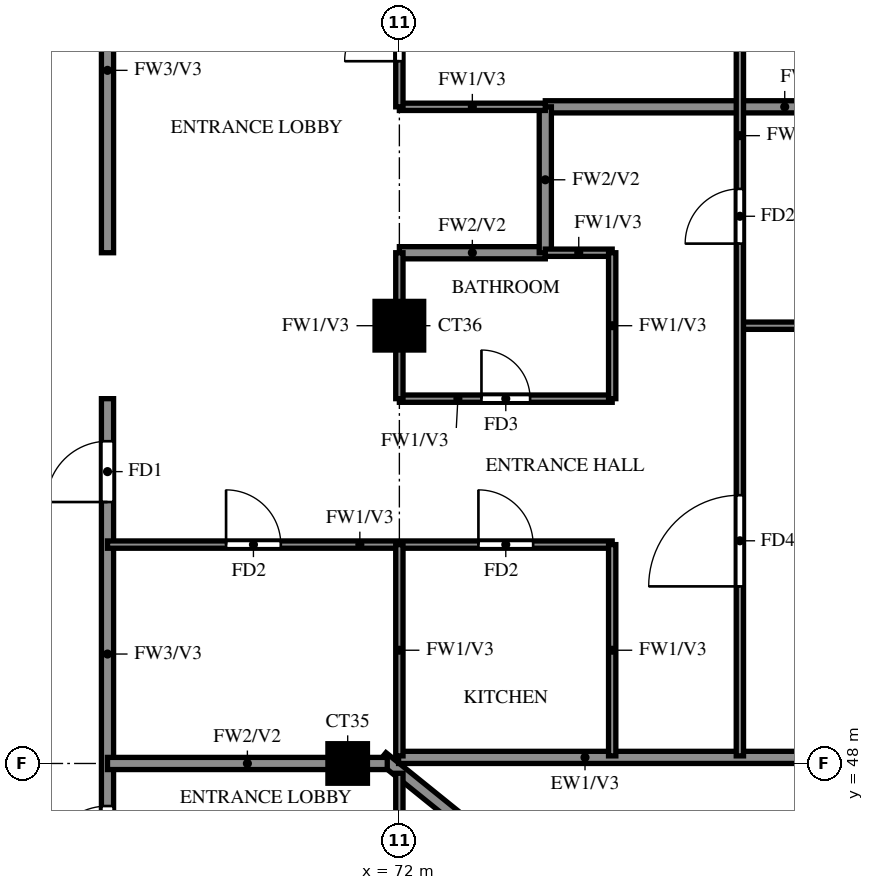
"""IFC4 building model, lengths in metres.
Left out: names, types, materials, properties, quantities, classifications, styles, units other than length and angle.
Written with IfcOpenShell. Run it as: python <this file> out.ifc"""

import sys

from ifc_helpers import new_model, si_unit, direction, frame, frame_2d, origin, origin_2d, place, context, subcontext, project, spatial, rectangle, extrude, source, transform, mapped, element, fill, save


model = new_model("IFC4")
c1 = context("Model", 3, precision=1e-05, world=origin(), true_north=direction((0.0, 1.0)))
c2 = subcontext(c1, "Body", "Model", "MODEL_VIEW")
j1 = project(units=[si_unit("LENGTHUNIT", "METRE"), si_unit("PLANEANGLEUNIT", "RADIAN")], contexts=[c1])
p1 = place(None, origin())
s1 = spatial("IfcSite", under=j1, at=p1, CompositionType="ELEMENT")
p2 = place(p1, origin())
s2 = spatial("IfcBuilding", under=s1, at=p2, CompositionType="ELEMENT")
p3 = place(p2, frame((0.0, 0.0, 246.5)))
s3 = spatial("IfcBuildingStorey", under=s2, at=p3, CompositionType="ELEMENT", Elevation=246.5)
m1 = source(origin(), c2, "Body", "SweptSolid", [
    extrude(rectangle(XDim=0.65, YDim=0.65, at=origin_2d()), origin(), (0.0, 0.0, 1.0), 3.22),
])
p4 = place(p3, frame((71.15, 48.0, 0.0), z_axis=(0.0, 0.0, 1.0), x_axis=(1.0, 0.0, 0.0)))
e1 = element("IfcColumn", 1, at=p4, inside=s3, PredefinedType="COLUMN", context=c2, shape_type="MappedRepresentation", body=[
    mapped(m1, transform((0.0, 0.0, 0.0))),
])
m2 = source(origin(), c2, "Body", "SweptSolid", [
    extrude(rectangle(XDim=0.8, YDim=0.8, at=origin_2d()), origin(), (0.0, 0.0, 1.0), 3.22),
])
p5 = place(p3, frame((72.0, 55.2, 0.0), z_axis=(0.0, 0.0, 1.0), x_axis=(1.0, 0.0, 0.0)))
e2 = element("IfcColumn", 2, at=p5, inside=s3, PredefinedType="COLUMN", context=c2, shape_type="MappedRepresentation", body=[
    mapped(m2, transform((0.0, 0.0, 0.0))),
])
p6 = place(p3, frame((81.907, 39.87, 0.0), z_axis=(0.0, 0.0, 1.0), x_axis=(-0.777936274417, 0.62834318087, 0.0)))
e3 = element("IfcWall", 3, at=p6, inside=s3, PredefinedType="SOLIDWALL", context=c2, shape_type="SweptSolid", body=[
    extrude(rectangle(XDim=13.099, YDim=0.2, at=frame_2d((6.549, 0.0))), origin(), (0.0, 0.0, 1.0), 3.22),
])
p7 = place(p6, frame((9.938, 0.0, 1.5)))
e4 = element("IfcOpeningElement", 4, at=p7, cuts=e3, PredefinedType="OPENING", context=c2, shape_type="SweptSolid", body=[
    extrude(rectangle(XDim=0.9, YDim=0.9, at=frame_2d((0.45, 0.45))), frame((0.0, 0.11, 0.0), z_axis=(0.0, -1.0, 0.0), x_axis=(1.0, 0.0, 0.0)), (0.0, 0.0, 1.0), 0.22),
])
p8 = place(p3, frame((71.987, 48.1, 0.0), z_axis=(0.0, 0.0, 1.0), x_axis=(1.0, 0.0, 0.0)))
e5 = element("IfcWall", 5, at=p8, inside=s3, PredefinedType="SOLIDWALL", context=c2, shape_type="SweptSolid", body=[
    extrude(rectangle(XDim=6.813, YDim=0.2, at=frame_2d((3.406, 0.0))), origin(), (0.0, 0.0, 1.0), 3.22),
])
p9 = place(p3, frame((67.2, 45.6, 0.0), z_axis=(0.0, 0.0, 1.0), x_axis=(0.0, 1.0, 0.0)))
e6 = element("IfcWall", 6, at=p9, inside=s3, PredefinedType="SOLIDWALL", context=c2, shape_type="SweptSolid", body=[
    extrude(rectangle(XDim=8.4, YDim=0.2, at=frame_2d((4.2, 0.0))), origin(), (0.0, 0.0, 1.0), 3.22),
])
p10 = place(p9, frame((6.7, 0.0, 0.0)))
e7 = element("IfcOpeningElement", 7, at=p10, cuts=e6, PredefinedType="OPENING", context=c2, shape_type="SweptSolid", body=[
    extrude(rectangle(XDim=1.0, YDim=2.1, at=frame_2d((0.5, 1.05))), frame((0.0, 0.11, 0.0), z_axis=(0.0, -1.0, 0.0), x_axis=(1.0, 0.0, 0.0)), (0.0, 0.0, 1.0), 0.22),
])
p11 = place(p9, frame((0.7, 0.0, 0.0)))
e8 = element("IfcOpeningElement", 8, at=p11, cuts=e6, PredefinedType="OPENING", context=c2, shape_type="SweptSolid", body=[
    extrude(rectangle(XDim=1.0, YDim=2.1, at=frame_2d((0.5, 1.05))), frame((0.0, 0.11, 0.0), z_axis=(0.0, -1.0, 0.0), x_axis=(1.0, 0.0, 0.0)), (0.0, 0.0, 1.0), 0.22),
])
p12 = place(p3, frame((67.2, 56.4, 0.0), z_axis=(0.0, 0.0, 1.0), x_axis=(0.0, 1.0, 0.0)))
e9 = element("IfcWall", 9, at=p12, inside=s3, PredefinedType="SOLIDWALL", context=c2, shape_type="SweptSolid", body=[
    extrude(rectangle(XDim=6.0, YDim=0.2, at=frame_2d((3.0, 0.0))), origin(), (0.0, 0.0, 1.0), 3.22),
])
p13 = place(p12, frame((3.7, 0.0, 0.0)))
e10 = element("IfcOpeningElement", 10, at=p13, cuts=e9, PredefinedType="OPENING", context=c2, shape_type="SweptSolid", body=[
    extrude(rectangle(XDim=1.0, YDim=2.1, at=frame_2d((0.5, 1.05))), frame((0.0, 0.11, 0.0), z_axis=(0.0, -1.0, 0.0), x_axis=(1.0, 0.0, 0.0)), (0.0, 0.0, 1.0), 0.22),
])
p14 = place(p3, frame((67.2, 48.0, 0.0), z_axis=(0.0, 0.0, 1.0), x_axis=(1.0, 0.0, 0.0)))
e11 = element("IfcWall", 11, at=p14, inside=s3, PredefinedType="SOLIDWALL", context=c2, shape_type="SweptSolid", body=[
    extrude(rectangle(XDim=4.601, YDim=0.2, at=frame_2d((2.301, 0.0))), origin(), (0.0, 0.0, 1.0), 3.22),
])
p15 = place(p3, frame((72.0, 56.4, 0.0), z_axis=(0.0, 0.0, 1.0), x_axis=(1.0, 0.0, 0.0)))
e12 = element("IfcWall", 12, at=p15, inside=s3, PredefinedType="SOLIDWALL", context=c2, shape_type="SweptSolid", body=[
    extrude(rectangle(XDim=2.4, YDim=0.2, at=frame_2d((1.2, 0.0))), origin(), (0.0, 0.0, 1.0), 3.22),
])
p16 = place(p3, frame((74.4, 58.8, 0.0), z_axis=(0.0, 0.0, 1.0), x_axis=(1.0, 0.0, 0.0)))
e13 = element("IfcWall", 13, at=p16, inside=s3, PredefinedType="SOLIDWALL", context=c2, shape_type="SweptSolid", body=[
    extrude(rectangle(XDim=7.875, YDim=0.2, at=frame_2d((3.938, 0.0))), origin(), (0.0, 0.0, 1.0), 2.32),
])
p17 = place(p3, frame((74.4, 56.4, 0.0), z_axis=(0.0, 0.0, 1.0), x_axis=(0.0, 1.0, 0.0)))
e14 = element("IfcWall", 14, at=p17, inside=s3, PredefinedType="SOLIDWALL", context=c2, shape_type="SweptSolid", body=[
    extrude(rectangle(XDim=2.4, YDim=0.2, at=frame_2d((1.2, 0.0))), origin(), (0.0, 0.0, 1.0), 3.22),
])
p18 = place(p3, frame((67.2, 51.6, 0.0), z_axis=(0.0, 0.0, 1.0), x_axis=(1.0, 0.0, 0.0)))
e15 = element("IfcWall", 15, at=p18, inside=s3, PredefinedType="PARTITIONING", context=c2, shape_type="SweptSolid", body=[
    extrude(rectangle(XDim=8.3, YDim=0.12, at=frame_2d((4.15, 0.0))), origin(), (0.0, 0.0, 1.0), 3.22),
])
p19 = place(p18, frame((6.1, 0.0, 0.0)))
e16 = element("IfcOpeningElement", 16, at=p19, cuts=e15, PredefinedType="OPENING", context=c2, shape_type="SweptSolid", body=[
    extrude(rectangle(XDim=0.9, YDim=2.1, at=frame_2d((0.45, 1.05))), frame((0.0, 0.07, 0.0), z_axis=(0.0, -1.0, 0.0), x_axis=(1.0, 0.0, 0.0)), (0.0, 0.0, 1.0), 0.14),
])
p20 = place(p18, frame((1.95, 0.0, 0.0)))
e17 = element("IfcOpeningElement", 17, at=p20, cuts=e15, PredefinedType="OPENING", context=c2, shape_type="SweptSolid", body=[
    extrude(rectangle(XDim=0.9, YDim=2.1, at=frame_2d((0.45, 1.05))), frame((0.0, 0.07, 0.0), z_axis=(0.0, -1.0, 0.0), x_axis=(1.0, 0.0, 0.0)), (0.0, 0.0, 1.0), 0.14),
])
p21 = place(p3, frame((72.0, 54.0, 0.0), z_axis=(0.0, 0.0, 1.0), x_axis=(1.0, 0.0, 0.0)))
e18 = element("IfcWall", 18, at=p21, inside=s3, PredefinedType="PARTITIONING", context=c2, shape_type="SweptSolid", body=[
    extrude(rectangle(XDim=3.5, YDim=0.12, at=frame_2d((1.75, 0.0))), origin(), (0.0, 0.0, 1.0), 3.22),
])
p22 = place(p21, frame((1.35, 0.0, 0.0)))
e19 = element("IfcOpeningElement", 19, at=p22, cuts=e18, PredefinedType="OPENING", context=c2, shape_type="SweptSolid", body=[
    extrude(rectangle(XDim=0.8, YDim=2.1, at=frame_2d((0.4, 1.05))), frame((0.0, 0.07, 0.0), z_axis=(0.0, -1.0, 0.0), x_axis=(1.0, 0.0, 0.0)), (0.0, 0.0, 1.0), 0.14),
])
p23 = place(p3, frame((77.6, 55.2, 0.0), z_axis=(0.0, 0.0, 1.0), x_axis=(1.0, 0.0, 0.0)))
e20 = element("IfcWall", 20, at=p23, inside=s3, PredefinedType="PARTITIONING", context=c2, shape_type="SweptSolid", body=[
    extrude(rectangle(XDim=4.675, YDim=0.12, at=frame_2d((2.337, 0.0))), origin(), (0.0, 0.0, 1.0), 3.22),
])
p24 = place(p3, frame((74.4, 56.4, 0.0), z_axis=(0.0, 0.0, 1.0), x_axis=(1.0, 0.0, 0.0)))
e21 = element("IfcWall", 21, at=p24, inside=s3, PredefinedType="PARTITIONING", context=c2, shape_type="SweptSolid", body=[
    extrude(rectangle(XDim=1.1, YDim=0.12, at=frame_2d((0.55, 0.0))), origin(), (0.0, 0.0, 1.0), 3.22),
])
p25 = place(p3, frame((72.0, 58.8, 0.0), z_axis=(0.0, 0.0, 1.0), x_axis=(1.0, 0.0, 0.0)))
e22 = element("IfcWall", 22, at=p25, inside=s3, PredefinedType="PARTITIONING", context=c2, shape_type="SweptSolid", body=[
    extrude(rectangle(XDim=2.4, YDim=0.12, at=frame_2d((1.2, 0.0))), origin(), (0.0, 0.0, 1.0), 3.22),
])
p26 = place(p3, frame((72.0, 39.725, 0.0), z_axis=(0.0, 0.0, 1.0), x_axis=(0.0, 1.0, 0.0)))
e23 = element("IfcWall", 23, at=p26, inside=s3, PredefinedType="PARTITIONING", context=c2, shape_type="SweptSolid", body=[
    extrude(rectangle(XDim=8.114, YDim=0.12, at=frame_2d((4.057, 0.0))), origin(), (0.0, 0.0, 1.0), 2.32),
])
p27 = place(p26, frame((1.788, 0.0, 0.0)))
e24 = element("IfcOpeningElement", 24, at=p27, cuts=e23, PredefinedType="OPENING", context=c2, shape_type="SweptSolid", body=[
    extrude(rectangle(XDim=0.9, YDim=2.1, at=frame_2d((0.45, 1.05))), frame((0.0, 0.07, 0.0), z_axis=(0.0, -1.0, 0.0), x_axis=(1.0, 0.0, 0.0)), (0.0, 0.0, 1.0), 0.14),
])
p28 = place(p26, frame((4.575, 0.0, 0.0)))
e25 = element("IfcOpeningElement", 25, at=p28, cuts=e23, PredefinedType="OPENING", context=c2, shape_type="SweptSolid", body=[
    extrude(rectangle(XDim=0.8, YDim=2.1, at=frame_2d((0.4, 1.05))), frame((0.0, 0.07, 0.0), z_axis=(0.0, -1.0, 0.0), x_axis=(1.0, 0.0, 0.0)), (0.0, 0.0, 1.0), 0.14),
])
p29 = place(p3, frame((72.0, 48.125, 0.0), z_axis=(0.0, 0.0, 1.0), x_axis=(0.0, 1.0, 0.0)))
e26 = element("IfcWall", 26, at=p29, inside=s3, PredefinedType="PARTITIONING", context=c2, shape_type="SweptSolid", body=[
    extrude(rectangle(XDim=3.475, YDim=0.12, at=frame_2d((1.738, 0.0))), origin(), (0.0, 0.0, 1.0), 3.22),
])
p30 = place(p3, frame((72.0, 54.0, 0.0), z_axis=(0.0, 0.0, 1.0), x_axis=(0.0, 1.0, 0.0)))
e27 = element("IfcWall", 27, at=p30, inside=s3, PredefinedType="PARTITIONING", context=c2, shape_type="SweptSolid", body=[
    extrude(rectangle(XDim=2.4, YDim=0.12, at=frame_2d((1.2, 0.0))), origin(), (0.0, 0.0, 1.0), 3.22),
])
p31 = place(p3, frame((72.0, 58.8, 0.0), z_axis=(0.0, 0.0, 1.0), x_axis=(0.0, 1.0, 0.0)))
e28 = element("IfcWall", 28, at=p31, inside=s3, PredefinedType="PARTITIONING", context=c2, shape_type="SweptSolid", body=[
    extrude(rectangle(XDim=3.6, YDim=0.12, at=frame_2d((1.8, 0.0))), origin(), (0.0, 0.0, 1.0), 3.22),
])
p32 = place(p31, frame((0.75, 0.0, 0.0)))
e29 = element("IfcOpeningElement", 29, at=p32, cuts=e28, PredefinedType="OPENING", context=c2, shape_type="SweptSolid", body=[
    extrude(rectangle(XDim=0.9, YDim=2.1, at=frame_2d((0.45, 1.05))), frame((0.0, 0.07, 0.0), z_axis=(0.0, -1.0, 0.0), x_axis=(1.0, 0.0, 0.0)), (0.0, 0.0, 1.0), 0.14),
])
p33 = place(p3, frame((75.5, 48.125, 0.0), z_axis=(0.0, 0.0, 1.0), x_axis=(0.0, 1.0, 0.0)))
e30 = element("IfcWall", 30, at=p33, inside=s3, PredefinedType="PARTITIONING", context=c2, shape_type="SweptSolid", body=[
    extrude(rectangle(XDim=3.475, YDim=0.12, at=frame_2d((1.738, 0.0))), origin(), (0.0, 0.0, 1.0), 3.22),
])
p34 = place(p3, frame((75.5, 54.0, 0.0), z_axis=(0.0, 0.0, 1.0), x_axis=(0.0, 1.0, 0.0)))
e31 = element("IfcWall", 31, at=p34, inside=s3, PredefinedType="PARTITIONING", context=c2, shape_type="SweptSolid", body=[
    extrude(rectangle(XDim=2.4, YDim=0.12, at=frame_2d((1.2, 0.0))), origin(), (0.0, 0.0, 1.0), 3.22),
])
p35 = place(p3, frame((77.6, 48.125, 0.0), z_axis=(0.0, 0.0, 1.0), x_axis=(0.0, 1.0, 0.0)))
e32 = element("IfcWall", 32, at=p35, inside=s3, PredefinedType="PARTITIONING", context=c2, shape_type="SweptSolid", body=[
    extrude(rectangle(XDim=21.475, YDim=0.12, at=frame_2d((10.738, 0.0))), origin(), (0.0, 0.0, 1.0), 3.22),
])
p36 = place(p35, frame((2.788, 0.0, 0.0)))
e33 = element("IfcOpeningElement", 33, at=p36, cuts=e32, PredefinedType="OPENING", context=c2, shape_type="SweptSolid", body=[
    extrude(rectangle(XDim=1.5, YDim=2.1, at=frame_2d((0.75, 1.05))), frame((0.0, 0.07, 0.0), z_axis=(0.0, -1.0, 0.0), x_axis=(1.0, 0.0, 0.0)), (0.0, 0.0, 1.0), 0.14),
])
p37 = place(p35, frame((8.425, 0.0, 0.0)))
e34 = element("IfcOpeningElement", 34, at=p37, cuts=e32, PredefinedType="OPENING", context=c2, shape_type="SweptSolid", body=[
    extrude(rectangle(XDim=0.9, YDim=2.1, at=frame_2d((0.45, 1.05))), frame((0.0, 0.07, 0.0), z_axis=(0.0, -1.0, 0.0), x_axis=(1.0, 0.0, 0.0)), (0.0, 0.0, 1.0), 0.14),
])
p38 = place(p35, frame((12.025, 0.0, 0.0)))
e35 = element("IfcOpeningElement", 35, at=p38, cuts=e32, PredefinedType="OPENING", context=c2, shape_type="SweptSolid", body=[
    extrude(rectangle(XDim=0.9, YDim=2.1, at=frame_2d((0.45, 1.05))), frame((0.0, 0.07, 0.0), z_axis=(0.0, -1.0, 0.0), x_axis=(1.0, 0.0, 0.0)), (0.0, 0.0, 1.0), 0.14),
])
p39 = place(p35, frame((17.425, 0.0, 0.0)))
e36 = element("IfcOpeningElement", 36, at=p39, cuts=e32, PredefinedType="OPENING", context=c2, shape_type="SweptSolid", body=[
    extrude(rectangle(XDim=0.9, YDim=2.1, at=frame_2d((0.45, 1.05))), frame((0.0, 0.07, 0.0), z_axis=(0.0, -1.0, 0.0), x_axis=(1.0, 0.0, 0.0)), (0.0, 0.0, 1.0), 0.14),
])
p40 = place(p10, origin())
e37 = element("IfcDoor", 37, at=p40, inside=s3, OperationType="SINGLE_SWING_LEFT", PredefinedType="DOOR", context=c2, shape_type="SweptSolid", body=[
    extrude(rectangle(XDim=1.0, YDim=2.1, at=frame_2d((0.5, 1.05))), frame((0.0, 0.025, 0.0), z_axis=(0.0, -1.0, 0.0), x_axis=(1.0, 0.0, 0.0)), (0.0, 0.0, 1.0), 0.05),
])
fill(e7, e37)
p41 = place(p36, origin())
e38 = element("IfcDoor", 38, at=p41, inside=s3, OperationType="SINGLE_SWING_LEFT", PredefinedType="DOOR", context=c2, shape_type="SweptSolid", body=[
    extrude(rectangle(XDim=1.5, YDim=2.1, at=frame_2d((0.75, 1.05))), frame((0.0, 0.025, 0.0), z_axis=(0.0, -1.0, 0.0), x_axis=(1.0, 0.0, 0.0)), (0.0, 0.0, 1.0), 0.05),
])
fill(e33, e38)
p42 = place(p37, origin())
e39 = element("IfcDoor", 39, at=p42, inside=s3, OperationType="SINGLE_SWING_RIGHT", PredefinedType="DOOR", context=c2, shape_type="SweptSolid", body=[
    extrude(rectangle(XDim=0.9, YDim=2.1, at=frame_2d((0.45, 1.05))), frame((0.0, 0.025, 0.0), z_axis=(0.0, -1.0, 0.0), x_axis=(1.0, 0.0, 0.0)), (0.0, 0.0, 1.0), 0.05),
])
fill(e34, e39)
p43 = place(p19, origin())
e40 = element("IfcDoor", 40, at=p43, inside=s3, OperationType="SINGLE_SWING_LEFT", PredefinedType="DOOR", context=c2, shape_type="SweptSolid", body=[
    extrude(rectangle(XDim=0.9, YDim=2.1, at=frame_2d((0.45, 1.05))), frame((0.0, 0.025, 0.0), z_axis=(0.0, -1.0, 0.0), x_axis=(1.0, 0.0, 0.0)), (0.0, 0.0, 1.0), 0.05),
])
fill(e16, e40)
p44 = place(p22, origin())
e41 = element("IfcDoor", 41, at=p44, inside=s3, OperationType="SINGLE_SWING_LEFT", PredefinedType="DOOR", context=c2, shape_type="SweptSolid", body=[
    extrude(rectangle(XDim=0.8, YDim=2.1, at=frame_2d((0.4, 1.05))), frame((0.0, 0.025, 0.0), z_axis=(0.0, -1.0, 0.0), x_axis=(1.0, 0.0, 0.0)), (0.0, 0.0, 1.0), 0.05),
])
fill(e19, e41)
p45 = place(p20, origin())
e42 = element("IfcDoor", 42, at=p45, inside=s3, OperationType="SINGLE_SWING_RIGHT", PredefinedType="DOOR", context=c2, shape_type="SweptSolid", body=[
    extrude(rectangle(XDim=0.9, YDim=2.1, at=frame_2d((0.45, 1.05))), frame((0.0, 0.025, 0.0), z_axis=(0.0, -1.0, 0.0), x_axis=(1.0, 0.0, 0.0)), (0.0, 0.0, 1.0), 0.05),
])
fill(e17, e42)
p46 = place(p32, origin())
e43 = element("IfcDoor", 43, at=p46, inside=s3, OperationType="SINGLE_SWING_RIGHT", PredefinedType="DOOR", context=c2, shape_type="SweptSolid", body=[
    extrude(rectangle(XDim=0.9, YDim=2.1, at=frame_2d((0.45, 1.05))), frame((0.0, 0.025, 0.0), z_axis=(0.0, -1.0, 0.0), x_axis=(1.0, 0.0, 0.0)), (0.0, 0.0, 1.0), 0.05),
])
fill(e29, e43)
p47 = place(p11, origin())
e44 = element("IfcDoor", 44, at=p47, inside=s3, OperationType="SINGLE_SWING_LEFT", PredefinedType="DOOR", context=c2, shape_type="SweptSolid", body=[
    extrude(rectangle(XDim=1.0, YDim=2.1, at=frame_2d((0.5, 1.05))), frame((0.0, 0.025, 0.0), z_axis=(0.0, -1.0, 0.0), x_axis=(1.0, 0.0, 0.0)), (0.0, 0.0, 1.0), 0.05),
])
fill(e8, e44)
save(model, sys.argv[1])
